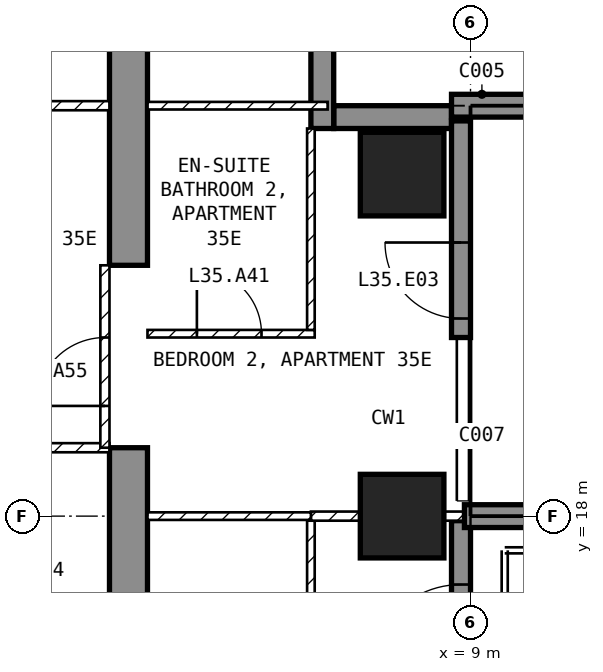
"""IFC4 building model, lengths in metres.
Left out: names, types, materials, properties, quantities, classifications, styles, units other than length and angle.
Written with IfcOpenShell. Run it as: python <this file> out.ifc"""

import sys

from ifc_helpers import new_model, si_unit, direction, frame, frame_2d, origin, origin_2d, place, context, subcontext, project, spatial, polyline, rectangle, outline, extrude, element, fill, save


model = new_model("IFC4")
c1 = context("Model", 3, precision=1e-05, world=origin(), true_north=direction((0.0, 1.0)))
c2 = subcontext(c1, "Body", "Model", "MODEL_VIEW")
j1 = project(units=[si_unit("LENGTHUNIT", "METRE"), si_unit("PLANEANGLEUNIT", "RADIAN")], contexts=[c1])
p1 = place(None, origin())
s1 = spatial("IfcSite", under=j1, at=p1, CompositionType="ELEMENT")
p2 = place(p1, origin())
s2 = spatial("IfcBuilding", under=s1, at=p2, CompositionType="ELEMENT")
p3 = place(p2, frame((0.0, 0.0, 144.4)))
s3 = spatial("IfcBuildingStorey", under=s2, at=p3, CompositionType="ELEMENT", Elevation=144.4)
for number, where, z_axis, x_axis in (
    (1, (8.1, 18.0, -0.25), (0.0, 0.0, 1.0), (1.0, 0.0, 0.0)),
    (2, (8.1, 22.5, -0.25), (0.0, 0.0, 1.0), (1.0, 0.0, 0.0)),
):
    element("IfcColumn", number, at=place(p3, frame(where, z_axis=z_axis, x_axis=x_axis)), inside=s3, PredefinedType="COLUMN", context=c2, shape_type="SweptSolid", body=[
        extrude(rectangle(XDim=1.1, YDim=1.1, at=origin_2d()), origin(), (0.0, 0.0, 1.0), 3.5),
    ])
p4 = place(p3, frame((4.25, 9.0, -0.25), z_axis=(1.0, 0.0, 0.0), x_axis=(0.0, 1.0, 0.0)))
e3 = element("IfcWall", 3, at=p4, inside=s3, PredefinedType="SHEAR", context=c2, shape_type="SweptSolid", body=[
    extrude(outline(polyline([(0.0, 0.0), (2.1, 0.0), (2.1, 2.65), (4.5, 2.65), (4.5, 0.0), (9.9, 0.0), (9.9, 2.65), (12.3, 2.65), (12.3, 0.0), (16.55, 0.0), (16.55, 3.5), (0.0, 3.5), (0.0, 0.0)])), origin(), (0.0, 0.0, 1.0), 0.5),
])
p5 = place(p3, frame((8.875, 15.65, 0.0), z_axis=(0.0, 0.0, 1.0), x_axis=(0.0, 1.0, 0.0)))
e4 = element("IfcWall", 4, at=p5, inside=s3, PredefinedType="SOLIDWALL", context=c2, shape_type="SweptSolid", body=[
    extrude(rectangle(XDim=2.29, YDim=0.25, at=frame_2d((1.145, 0.0))), origin(), (0.0, 0.0, 1.0), 3.25),
])
p6 = place(p5, frame((0.25, 0.0, 0.0)))
e5 = element("IfcOpeningElement", 5, at=p6, cuts=e4, PredefinedType="OPENING", context=c2, shape_type="SweptSolid", body=[
    extrude(rectangle(XDim=1.2, YDim=2.4, at=frame_2d((0.6, 1.2))), frame((0.0, 0.135, 0.0), z_axis=(0.0, -1.0, 0.0), x_axis=(1.0, 0.0, 0.0)), (0.0, 0.0, 1.0), 0.27),
])
p7 = place(p3, frame((8.875, 20.35, 0.0), z_axis=(0.0, 0.0, 1.0), x_axis=(0.0, 1.0, 0.0)))
e6 = element("IfcWall", 6, at=p7, inside=s3, PredefinedType="SOLIDWALL", context=c2, shape_type="SweptSolid", body=[
    extrude(rectangle(XDim=2.85, YDim=0.25, at=frame_2d((1.425, 0.0))), origin(), (0.0, 0.0, 1.0), 3.25),
])
p8 = place(p7, frame((0.25, 0.0, 0.0)))
e7 = element("IfcOpeningElement", 7, at=p8, cuts=e6, PredefinedType="OPENING", context=c2, shape_type="SweptSolid", body=[
    extrude(rectangle(XDim=1.0, YDim=2.4, at=frame_2d((0.5, 1.2))), frame((0.0, 0.135, 0.0), z_axis=(0.0, -1.0, 0.0), x_axis=(1.0, 0.0, 0.0)), (0.0, 0.0, 1.0), 0.27),
])
p9 = place(p3, frame((8.75, 23.25, 0.0), z_axis=(0.0, 0.0, 1.0), x_axis=(-1.0, 0.0, 0.0)))
e8 = element("IfcWall", 8, at=p9, inside=s3, PredefinedType="SOLIDWALL", context=c2, shape_type="SweptSolid", body=[
    extrude(rectangle(XDim=1.55, YDim=0.3, at=frame_2d((0.775, 0.0))), origin(), (0.0, 0.0, 1.0), 3.25),
])
p10 = place(p3, frame((7.05, 23.1, 0.0), z_axis=(0.0, 0.0, 1.0), x_axis=(0.0, 1.0, 0.0)))
e9 = element("IfcWall", 9, at=p10, inside=s3, PredefinedType="SOLIDWALL", context=c2, shape_type="SweptSolid", body=[
    extrude(rectangle(XDim=1.8, YDim=0.3, at=frame_2d((0.9, 0.0))), origin(), (0.0, 0.0, 1.0), 3.25),
])
p11 = place(p3, frame((8.92, 18.0, 0.0), z_axis=(0.0, 0.0, 1.0), x_axis=(1.0, 0.0, 0.0)))
e10 = element("IfcWall", 10, at=p11, inside=s3, PredefinedType="SOLIDWALL", context=c2, shape_type="SweptSolid", body=[
    extrude(rectangle(XDim=2.82, YDim=0.3, at=frame_2d((1.41, 0.0))), origin(), (0.0, 0.0, 1.0), 3.25),
])
p12 = place(p3, frame((8.75, 23.4, 0.0), z_axis=(0.0, 0.0, 1.0), x_axis=(1.0, 0.0, 0.0)))
e11 = element("IfcWall", 11, at=p12, inside=s3, PredefinedType="SOLIDWALL", context=c2, shape_type="SweptSolid", body=[
    extrude(rectangle(XDim=2.95, YDim=0.3, at=frame_2d((1.475, 0.0))), origin(), (0.0, 0.0, 1.0), 3.25),
])
p13 = place(p3, frame((-4.25, 18.9, 0.0), z_axis=(0.0, 0.0, 1.0), x_axis=(1.0, 0.0, 0.0)))
e12 = element("IfcWall", 12, at=p13, inside=s3, PredefinedType="PARTITIONING", context=c2, shape_type="SweptSolid", body=[
    extrude(rectangle(XDim=8.5, YDim=0.12, at=frame_2d((4.25, 0.0))), origin(), (0.0, 0.0, 1.0), 3.25),
])
p14 = place(p13, frame((1.925, 0.0, 0.0)))
e13 = element("IfcOpeningElement", 13, at=p14, cuts=e12, PredefinedType="OPENING", context=c2, shape_type="SweptSolid", body=[
    extrude(rectangle(XDim=0.9, YDim=2.1, at=frame_2d((0.45, 1.05))), frame((0.0, 0.07, 0.0), z_axis=(0.0, -1.0, 0.0), x_axis=(1.0, 0.0, 0.0)), (0.0, 0.0, 1.0), 0.14),
])
p15 = place(p3, frame((-4.25, 23.4, 0.0), z_axis=(0.0, 0.0, 1.0), x_axis=(1.0, 0.0, 0.0)))
e14 = element("IfcWall", 14, at=p15, inside=s3, PredefinedType="PARTITIONING", context=c2, shape_type="SweptSolid", body=[
    extrude(rectangle(XDim=8.5, YDim=0.12, at=frame_2d((4.25, 0.0))), origin(), (0.0, 0.0, 1.0), 3.25),
])
p16 = place(p15, frame((1.925, 0.0, 0.0)))
e15 = element("IfcOpeningElement", 15, at=p16, cuts=e14, PredefinedType="OPENING", context=c2, shape_type="SweptSolid", body=[
    extrude(rectangle(XDim=0.9, YDim=2.1, at=frame_2d((0.45, 1.05))), frame((0.0, 0.07, 0.0), z_axis=(0.0, -1.0, 0.0), x_axis=(1.0, 0.0, 0.0)), (0.0, 0.0, 1.0), 0.14),
])
p17 = place(p3, frame((6.9, 14.45, 0.0), z_axis=(0.0, 0.0, 1.0), x_axis=(0.0, 1.0, 0.0)))
e16 = element("IfcWall", 16, at=p17, inside=s3, PredefinedType="PARTITIONING", context=c2, shape_type="SweptSolid", body=[
    extrude(rectangle(XDim=3.49, YDim=0.1, at=frame_2d((1.745, 0.0))), origin(), (0.0, 0.0, 1.0), 3.25),
])
p18 = place(p3, frame((6.9, 18.0, 0.0), z_axis=(0.0, 0.0, 1.0), x_axis=(1.0, 0.0, 0.0)))
e17 = element("IfcWall", 17, at=p18, inside=s3, PredefinedType="PARTITIONING", context=c2, shape_type="SweptSolid", body=[
    extrude(rectangle(XDim=2.02, YDim=0.12, at=frame_2d((1.01, 0.0))), origin(), (0.0, 0.0, 1.0), 2.414),
])
p19 = place(p3, frame((4.75, 18.0, 0.0), z_axis=(0.0, 0.0, 1.0), x_axis=(1.0, 0.0, 0.0)))
e18 = element("IfcWall", 18, at=p19, inside=s3, PredefinedType="PARTITIONING", context=c2, shape_type="SweptSolid", body=[
    extrude(rectangle(XDim=2.15, YDim=0.1, at=frame_2d((1.075, 0.0))), origin(), (0.0, 0.0, 1.0), 2.414),
])
p20 = place(p3, frame((4.75, 20.4, 0.0), z_axis=(0.0, 0.0, 1.0), x_axis=(1.0, 0.0, 0.0)))
e19 = element("IfcWall", 19, at=p20, inside=s3, PredefinedType="PARTITIONING", context=c2, shape_type="SweptSolid", body=[
    extrude(rectangle(XDim=2.2, YDim=0.1, at=frame_2d((1.1, 0.0))), origin(), (0.0, 0.0, 1.0), 3.25),
])
p21 = place(p20, frame((0.65, 0.0, 0.0)))
e20 = element("IfcOpeningElement", 20, at=p21, cuts=e19, PredefinedType="OPENING", context=c2, shape_type="SweptSolid", body=[
    extrude(rectangle(XDim=0.85, YDim=2.1, at=frame_2d((0.425, 1.05))), frame((0.0, 0.06, 0.0), z_axis=(0.0, -1.0, 0.0), x_axis=(1.0, 0.0, 0.0)), (0.0, 0.0, 1.0), 0.12),
])
p22 = place(p3, frame((6.9, 20.45, 0.0), z_axis=(0.0, 0.0, 1.0), x_axis=(0.0, 1.0, 0.0)))
e21 = element("IfcWall", 21, at=p22, inside=s3, PredefinedType="PARTITIONING", context=c2, shape_type="SweptSolid", body=[
    extrude(rectangle(XDim=2.65, YDim=0.1, at=frame_2d((1.325, 0.0))), origin(), (0.0, 0.0, 1.0), 3.25),
])
p23 = place(p3, frame((4.75, 23.4, 0.0), z_axis=(0.0, 0.0, 1.0), x_axis=(1.0, 0.0, 0.0)))
e22 = element("IfcWall", 22, at=p23, inside=s3, PredefinedType="PARTITIONING", context=c2, shape_type="SweptSolid", body=[
    extrude(rectangle(XDim=2.37, YDim=0.1, at=frame_2d((1.185, 0.0))), origin(), (0.0, 0.0, 1.0), 3.25),
])
p24 = place(p3, frame((4.19, 18.9, 0.0), z_axis=(0.0, 0.0, 1.0), x_axis=(0.0, 1.0, 0.0)))
e23 = element("IfcWall", 23, at=p24, inside=s3, PredefinedType="PARTITIONING", context=c2, shape_type="SweptSolid", body=[
    extrude(rectangle(XDim=2.4, YDim=0.12, at=frame_2d((1.2, 0.0))), origin(), (0.0, 0.0, 1.0), 2.4),
])
p25 = place(p24, frame((0.55, 0.0, 0.0)))
e24 = element("IfcOpeningElement", 24, at=p25, cuts=e23, PredefinedType="OPENING", context=c2, shape_type="SweptSolid", body=[
    extrude(rectangle(XDim=0.9, YDim=2.1, at=frame_2d((0.45, 1.05))), frame((0.0, 0.07, 0.0), z_axis=(0.0, -1.0, 0.0), x_axis=(1.0, 0.0, 0.0)), (0.0, 0.0, 1.0), 0.14),
])
p26 = place(p6, origin())
e25 = element("IfcDoor", 25, at=p26, inside=s3, OperationType="SINGLE_SWING_LEFT", PredefinedType="DOOR", context=c2, shape_type="SweptSolid", body=[
    extrude(rectangle(XDim=1.2, YDim=2.4, at=frame_2d((0.6, 1.2))), frame((0.0, 0.025, 0.0), z_axis=(0.0, -1.0, 0.0), x_axis=(1.0, 0.0, 0.0)), (0.0, 0.0, 1.0), 0.05),
])
fill(e5, e25)
p27 = place(p8, origin())
e26 = element("IfcDoor", 26, at=p27, inside=s3, OperationType="SINGLE_SWING_RIGHT", PredefinedType="DOOR", context=c2, shape_type="SweptSolid", body=[
    extrude(rectangle(XDim=1.0, YDim=2.4, at=frame_2d((0.5, 1.2))), frame((0.0, 0.025, 0.0), z_axis=(0.0, -1.0, 0.0), x_axis=(1.0, 0.0, 0.0)), (0.0, 0.0, 1.0), 0.05),
])
fill(e7, e26)
p28 = place(p21, origin())
e27 = element("IfcDoor", 27, at=p28, inside=s3, OperationType="SINGLE_SWING_LEFT", PredefinedType="DOOR", context=c2, shape_type="SweptSolid", body=[
    extrude(rectangle(XDim=0.85, YDim=2.1, at=frame_2d((0.425, 1.05))), frame((0.0, 0.025, 0.0), z_axis=(0.0, -1.0, 0.0), x_axis=(1.0, 0.0, 0.0)), (0.0, 0.0, 1.0), 0.05),
])
fill(e20, e27)
p29 = place(p25, origin())
e28 = element("IfcDoor", 28, at=p29, inside=s3, OperationType="SINGLE_SWING_LEFT", PredefinedType="DOOR", context=c2, shape_type="SweptSolid", body=[
    extrude(rectangle(XDim=0.9, YDim=2.1, at=frame_2d((0.45, 1.05))), frame((0.0, 0.025, 0.0), z_axis=(0.0, -1.0, 0.0), x_axis=(1.0, 0.0, 0.0)), (0.0, 0.0, 1.0), 0.05),
])
fill(e24, e28)
save(model, sys.argv[1])
